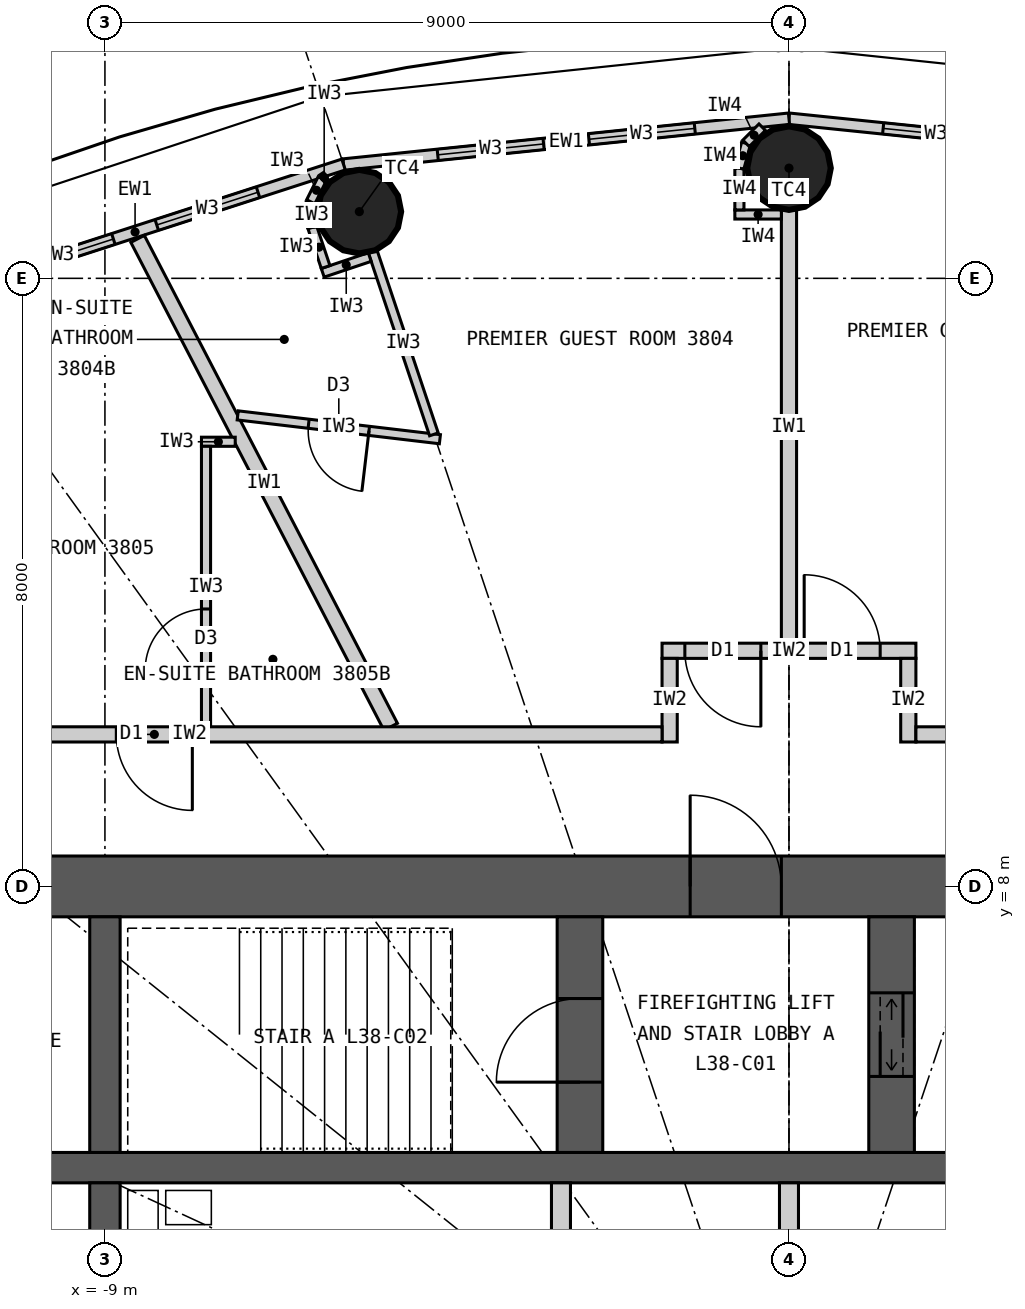
"""IFC4 building model, lengths in metres.
Left out: names, types, materials, properties, quantities, classifications, styles, units other than length and angle.
Written with IfcOpenShell. Run it as: python <this file> out.ifc"""

import sys

from ifc_helpers import new_model, si_unit, direction, frame, frame_2d, origin, origin_2d, place, context, subcontext, project, spatial, rectangle, circle, extrude, element, fill, save


model = new_model("IFC4")
c1 = context("Model", 3, precision=1e-05, world=origin(), true_north=direction((0.0, 1.0)))
c2 = subcontext(c1, "Body", "Model", "MODEL_VIEW")
j1 = project(units=[si_unit("LENGTHUNIT", "METRE"), si_unit("PLANEANGLEUNIT", "RADIAN")], contexts=[c1])
p1 = place(None, origin())
s1 = spatial("IfcSite", under=j1, at=p1, CompositionType="ELEMENT")
p2 = place(p1, origin())
s2 = spatial("IfcBuilding", under=s1, at=p2, CompositionType="ELEMENT")
p3 = place(p2, frame((0.0, 0.0, 146.7)))
s3 = spatial("IfcBuildingStorey", under=s2, at=p3, CompositionType="ELEMENT", Elevation=146.7)
for number, where, z_axis, x_axis in (
    (1, (0.0, 17.45, 0.0), (0.0, 0.0, 1.0), (1.0, 0.0, 0.0)),
    (2, (-5.653, 16.877, 0.0), (0.0, 0.0, 1.0), (1.0, 0.0, 0.0)),
):
    element("IfcColumn", number, at=place(p3, frame(where, z_axis=z_axis, x_axis=x_axis)), inside=s3, PredefinedType="COLUMN", context=c2, shape_type="SweptSolid", body=[
        extrude(circle(Radius=0.55, at=origin_2d()), origin(), (0.0, 0.0, 1.0), 3.3),
    ])
p4 = place(p3, frame((-12.4, 8.0, 0.0), z_axis=(0.0, 0.0, 1.0), x_axis=(1.0, 0.0, 0.0)))
e3 = element("IfcWall", 3, at=p4, inside=s3, PredefinedType="SHEAR", context=c2, shape_type="SweptSolid", body=[
    extrude(rectangle(XDim=24.8, YDim=0.8, at=frame_2d((12.4, 0.0))), origin(), (0.0, 0.0, 1.0), 3.3),
])
p5 = place(p4, frame((11.1, 0.0, 0.0)))
e4 = element("IfcOpeningElement", 4, at=p5, cuts=e3, PredefinedType="OPENING", context=c2, shape_type="SweptSolid", body=[
    extrude(rectangle(XDim=1.2, YDim=2.2, at=frame_2d((0.6, 1.1))), frame((0.0, 0.41, 0.0), z_axis=(0.0, -1.0, 0.0), x_axis=(1.0, 0.0, 0.0)), (0.0, 0.0, 1.0), 0.82),
])
p6 = place(p4, frame((18.7, 0.0, 0.0)))
e5 = element("IfcOpeningElement", 5, at=p6, cuts=e3, PredefinedType="OPENING", context=c2, shape_type="SweptSolid", body=[
    extrude(rectangle(XDim=0.9, YDim=2.2, at=frame_2d((0.45, 1.1))), frame((0.0, 0.41, 0.0), z_axis=(0.0, -1.0, 0.0), x_axis=(1.0, 0.0, 0.0)), (0.0, 0.0, 1.0), 0.82),
])
p7 = place(p3, frame((-11.6, 4.3, 0.0), z_axis=(0.0, 0.0, 1.0), x_axis=(1.0, 0.0, 0.0)))
e6 = element("IfcWall", 6, at=p7, inside=s3, PredefinedType="SHEAR", context=c2, shape_type="SweptSolid", body=[
    extrude(rectangle(XDim=23.2, YDim=0.4, at=frame_2d((11.6, 0.0))), origin(), (0.0, 0.0, 1.0), 3.3),
])
p8 = place(p3, frame((-9.0, 4.5, 0.0), z_axis=(0.0, 0.0, 1.0), x_axis=(0.0, 1.0, 0.0)))
e7 = element("IfcWall", 7, at=p8, inside=s3, PredefinedType="SHEAR", context=c2, shape_type="SweptSolid", body=[
    extrude(rectangle(XDim=3.1, YDim=0.4, at=frame_2d((1.55, 0.0))), origin(), (0.0, 0.0, 1.0), 3.3),
])
p9 = place(p3, frame((-9.0, 1.75, 0.0), z_axis=(0.0, 0.0, 1.0), x_axis=(0.0, 1.0, 0.0)))
e8 = element("IfcWall", 8, at=p9, inside=s3, PredefinedType="SHEAR", context=c2, shape_type="SweptSolid", body=[
    extrude(rectangle(XDim=2.35, YDim=0.4, at=frame_2d((1.175, 0.0))), origin(), (0.0, 0.0, 1.0), 3.3),
])
p10 = place(p3, frame((-2.75, 4.5, 0.0), z_axis=(0.0, 0.0, 1.0), x_axis=(0.0, 1.0, 0.0)))
e9 = element("IfcWall", 9, at=p10, inside=s3, PredefinedType="SHEAR", context=c2, shape_type="SweptSolid", body=[
    extrude(rectangle(XDim=3.1, YDim=0.6, at=frame_2d((1.55, 0.0))), origin(), (0.0, 0.0, 1.0), 3.3),
])
p11 = place(p10, frame((0.925, 0.0, 0.0)))
e10 = element("IfcOpeningElement", 10, at=p11, cuts=e9, PredefinedType="OPENING", context=c2, shape_type="SweptSolid", body=[
    extrude(rectangle(XDim=1.1, YDim=2.2, at=frame_2d((0.55, 1.1))), frame((0.0, 0.31, 0.0), z_axis=(0.0, -1.0, 0.0), x_axis=(1.0, 0.0, 0.0)), (0.0, 0.0, 1.0), 0.62),
])
p12 = place(p3, frame((1.35, 4.5, 0.0), z_axis=(0.0, 0.0, 1.0), x_axis=(0.0, 1.0, 0.0)))
e11 = element("IfcWall", 11, at=p12, inside=s3, PredefinedType="SHEAR", context=c2, shape_type="SweptSolid", body=[
    extrude(rectangle(XDim=3.1, YDim=0.6, at=frame_2d((1.55, 0.0))), origin(), (0.0, 0.0, 1.0), 3.3),
])
p13 = place(p12, frame((1.0, 0.0, 0.0)))
e12 = element("IfcOpeningElement", 12, at=p13, cuts=e11, PredefinedType="OPENING", context=c2, shape_type="SweptSolid", body=[
    extrude(rectangle(XDim=1.1, YDim=2.2, at=frame_2d((0.55, 1.1))), frame((0.0, 0.31, 0.0), z_axis=(0.0, -1.0, 0.0), x_axis=(1.0, 0.0, 0.0)), (0.0, 0.0, 1.0), 0.62),
])
for number, where, z_axis, x_axis in (
    (13, (-3.0, 1.75, 0.0), (0.0, 0.0, 1.0), (0.0, 1.0, 0.0)),
    (14, (0.0, 1.75, 0.0), (0.0, 0.0, 1.0), (0.0, 1.0, 0.0)),
):
    element("IfcWall", number, at=place(p3, frame(where, z_axis=z_axis, x_axis=x_axis)), inside=s3, PredefinedType="PARTITIONING", context=c2, shape_type="SweptSolid", body=[
        extrude(rectangle(XDim=2.35, YDim=0.25, at=frame_2d((1.175, 0.0))), origin(), (0.0, 0.0, 1.0), 3.3),
    ])
p14 = place(p3, frame((5.86, 17.497, 0.0), z_axis=(0.0, 0.0, 1.0), x_axis=(-0.994751738032, 0.102318032045, 0.0)))
e15 = element("IfcWall", 15, at=p14, inside=s3, PredefinedType="ELEMENTEDWALL", context=c2, shape_type="SweptSolid", body=[
    extrude(rectangle(XDim=5.891, YDim=0.15, at=frame_2d((2.946, 0.0))), origin(), (0.0, 0.0, 1.0), 3.12),
])
p15 = place(p14, frame((1.246, 0.0, 0.9)))
e16 = element("IfcOpeningElement", 16, at=p15, cuts=e15, PredefinedType="OPENING", context=c2, shape_type="SweptSolid", body=[
    extrude(rectangle(XDim=1.4, YDim=1.9, at=frame_2d((0.7, 0.95))), frame((0.0, 0.085, 0.0), z_axis=(0.0, -1.0, 0.0), x_axis=(1.0, 0.0, 0.0)), (0.0, 0.0, 1.0), 0.17),
])
p16 = place(p14, frame((3.246, 0.0, 0.9)))
e17 = element("IfcOpeningElement", 17, at=p16, cuts=e15, PredefinedType="OPENING", context=c2, shape_type="SweptSolid", body=[
    extrude(rectangle(XDim=1.4, YDim=1.9, at=frame_2d((0.7, 0.95))), frame((0.0, 0.085, 0.0), z_axis=(0.0, -1.0, 0.0), x_axis=(1.0, 0.0, 0.0)), (0.0, 0.0, 1.0), 0.17),
])
p17 = place(p3, frame((0.0, 18.1, 0.0), z_axis=(0.0, 0.0, 1.0), x_axis=(-0.994751738032, -0.102318032045, 0.0)))
e18 = element("IfcWall", 18, at=p17, inside=s3, PredefinedType="ELEMENTEDWALL", context=c2, shape_type="SweptSolid", body=[
    extrude(rectangle(XDim=5.891, YDim=0.15, at=frame_2d((2.946, 0.0))), origin(), (0.0, 0.0, 1.0), 3.12),
])
p18 = place(p17, frame((1.246, 0.0, 0.9)))
e19 = element("IfcOpeningElement", 19, at=p18, cuts=e18, PredefinedType="OPENING", context=c2, shape_type="SweptSolid", body=[
    extrude(rectangle(XDim=1.4, YDim=1.9, at=frame_2d((0.7, 0.95))), frame((0.0, 0.085, 0.0), z_axis=(0.0, -1.0, 0.0), x_axis=(1.0, 0.0, 0.0)), (0.0, 0.0, 1.0), 0.17),
])
p19 = place(p17, frame((3.246, 0.0, 0.9)))
e20 = element("IfcOpeningElement", 20, at=p19, cuts=e18, PredefinedType="OPENING", context=c2, shape_type="SweptSolid", body=[
    extrude(rectangle(XDim=1.4, YDim=1.9, at=frame_2d((0.7, 0.95))), frame((0.0, 0.085, 0.0), z_axis=(0.0, -1.0, 0.0), x_axis=(1.0, 0.0, 0.0)), (0.0, 0.0, 1.0), 0.17),
])
p20 = place(p3, frame((-5.86, 17.497, 0.0), z_axis=(0.0, 0.0, 1.0), x_axis=(-0.951432482129, -0.307857486429, 0.0)))
e21 = element("IfcWall", 21, at=p20, inside=s3, PredefinedType="ELEMENTEDWALL", context=c2, shape_type="SweptSolid", body=[
    extrude(rectangle(XDim=5.766, YDim=0.15, at=frame_2d((2.883, 0.0))), origin(), (0.0, 0.0, 1.0), 3.12),
])
p21 = place(p20, frame((1.183, 0.0, 0.9)))
e22 = element("IfcOpeningElement", 22, at=p21, cuts=e21, PredefinedType="OPENING", context=c2, shape_type="SweptSolid", body=[
    extrude(rectangle(XDim=1.4, YDim=1.9, at=frame_2d((0.7, 0.95))), frame((0.0, 0.085, 0.0), z_axis=(0.0, -1.0, 0.0), x_axis=(1.0, 0.0, 0.0)), (0.0, 0.0, 1.0), 0.17),
])
p22 = place(p20, frame((3.183, 0.0, 0.9)))
e23 = element("IfcOpeningElement", 23, at=p22, cuts=e21, PredefinedType="OPENING", context=c2, shape_type="SweptSolid", body=[
    extrude(rectangle(XDim=1.4, YDim=1.9, at=frame_2d((0.7, 0.95))), frame((0.0, 0.085, 0.0), z_axis=(0.0, -1.0, 0.0), x_axis=(1.0, 0.0, 0.0)), (0.0, 0.0, 1.0), 0.17),
])
p23 = place(p3, frame((0.0, 11.2, 0.0), z_axis=(0.0, 0.0, 1.0), x_axis=(0.0, 1.0, 0.0)))
e24 = element("IfcWall", 24, at=p23, inside=s3, PredefinedType="PARTITIONING", context=c2, shape_type="SweptSolid", body=[
    extrude(rectangle(XDim=5.7, YDim=0.2, at=frame_2d((2.85, 0.0))), origin(), (0.0, 0.0, 1.0), 2.42),
])
p24 = place(p3, frame((-5.24, 10.1, 0.0), z_axis=(0.0, 0.0, 1.0), x_axis=(-0.460532965373, 0.887642601391, 0.0)))
e25 = element("IfcWall", 25, at=p24, inside=s3, PredefinedType="PARTITIONING", context=c2, shape_type="SweptSolid", body=[
    extrude(rectangle(XDim=7.231, YDim=0.2, at=frame_2d((3.616, 0.0))), origin(), (0.0, 0.0, 1.0), 3.12),
])
p25 = place(p3, frame((-1.67, 11.1, 0.0), z_axis=(0.0, 0.0, 1.0), x_axis=(1.0, 0.0, 0.0)))
e26 = element("IfcWall", 26, at=p25, inside=s3, PredefinedType="PARTITIONING", context=c2, shape_type="SweptSolid", body=[
    extrude(rectangle(XDim=3.34, YDim=0.2, at=frame_2d((1.67, 0.0))), origin(), (0.0, 0.0, 1.0), 3.12),
])
p26 = place(p25, frame((1.87, 0.0, 0.0)))
e27 = element("IfcOpeningElement", 27, at=p26, cuts=e26, PredefinedType="OPENING", context=c2, shape_type="SweptSolid", body=[
    extrude(rectangle(XDim=1.0, YDim=2.2, at=frame_2d((0.5, 1.1))), frame((0.0, 0.11, 0.0), z_axis=(0.0, -1.0, 0.0), x_axis=(1.0, 0.0, 0.0)), (0.0, 0.0, 1.0), 0.22),
])
p27 = place(p25, frame((0.3, 0.0, 0.0)))
e28 = element("IfcOpeningElement", 28, at=p27, cuts=e26, PredefinedType="OPENING", context=c2, shape_type="SweptSolid", body=[
    extrude(rectangle(XDim=1.0, YDim=2.2, at=frame_2d((0.5, 1.1))), frame((0.0, 0.11, 0.0), z_axis=(0.0, -1.0, 0.0), x_axis=(1.0, 0.0, 0.0)), (0.0, 0.0, 1.0), 0.22),
])
for number, where, z_axis, x_axis in (
    (29, (-1.57, 9.9, 0.0), (0.0, 0.0, 1.0), (0.0, 1.0, 0.0)),
    (30, (1.57, 9.9, 0.0), (0.0, 0.0, 1.0), (0.0, 1.0, 0.0)),
):
    element("IfcWall", number, at=place(p3, frame(where, z_axis=z_axis, x_axis=x_axis)), inside=s3, PredefinedType="PARTITIONING", context=c2, shape_type="SweptSolid", body=[
        extrude(rectangle(XDim=1.1, YDim=0.2, at=frame_2d((0.55, 0.0))), origin(), (0.0, 0.0, 1.0), 3.12),
    ])
p28 = place(p3, frame((-7.253, 14.197, 0.0), z_axis=(0.0, 0.0, 1.0), x_axis=(0.993128188393, -0.117031625725, 0.0)))
e31 = element("IfcWall", 31, at=p28, inside=s3, PredefinedType="PARTITIONING", context=c2, shape_type="SweptSolid", body=[
    extrude(rectangle(XDim=2.678, YDim=0.12, at=frame_2d((1.339, 0.0))), origin(), (0.0, 0.0, 1.0), 3.12),
])
p29 = place(p28, frame((0.939, 0.0, 0.0)))
e32 = element("IfcOpeningElement", 32, at=p29, cuts=e31, PredefinedType="OPENING", context=c2, shape_type="SweptSolid", body=[
    extrude(rectangle(XDim=0.8, YDim=2.1, at=frame_2d((0.4, 1.05))), frame((0.0, 0.07, 0.0), z_axis=(0.0, -1.0, 0.0), x_axis=(1.0, 0.0, 0.0)), (0.0, 0.0, 1.0), 0.14),
])
p30 = place(p3, frame((-4.671, 13.948, 0.0), z_axis=(0.0, 0.0, 1.0), x_axis=(-0.317669167093, 0.948201613729, 0.0)))
e33 = element("IfcWall", 33, at=p30, inside=s3, PredefinedType="PARTITIONING", context=c2, shape_type="SweptSolid", body=[
    extrude(rectangle(XDim=2.54, YDim=0.12, at=frame_2d((1.27, 0.0))), origin(), (0.0, 0.0, 1.0), 2.42),
])
p31 = place(p3, frame((-5.516, 16.28, 0.0), z_axis=(0.0, 0.0, 1.0), x_axis=(-0.948157944392, -0.317799484717, 0.0)))
e34 = element("IfcWall", 34, at=p31, inside=s3, PredefinedType="PARTITIONING", context=c2, shape_type="SweptSolid", body=[
    extrude(rectangle(XDim=0.652, YDim=0.12, at=frame_2d((0.326, 0.0))), origin(), (0.0, 0.0, 1.0), 3.12),
])
p32 = place(p3, frame((-6.097, 16.149, 0.0), z_axis=(0.0, 0.0, 1.0), x_axis=(-0.317292604854, 0.948327687514, 0.0)))
e35 = element("IfcWall", 35, at=p32, inside=s3, PredefinedType="PARTITIONING", context=c2, shape_type="SweptSolid", body=[
    extrude(rectangle(XDim=0.55, YDim=0.12, at=frame_2d((0.275, 0.0))), origin(), (0.0, 0.0, 1.0), 3.12),
])
for number, where, z_axis, x_axis in (
    (36, (-6.271, 16.67, 0.0), (0.0, 0.0, 1.0), (-0.061, 0.998, 0.0)),
    (37, (-6.292, 17.007, 0.0), (0.0, 0.0, 1.0), (0.445, 0.895, 0.0)),
):
    element("IfcWall", number, at=place(p3, frame(where, z_axis=z_axis, x_axis=x_axis)), inside=s3, PredefinedType="PARTITIONING", context=c2, shape_type="SweptSolid", body=[
        extrude(rectangle(XDim=0.338, YDim=0.12, at=frame_2d((0.169, 0.0))), origin(), (0.0, 0.0, 1.0), 3.12),
    ])
p33 = place(p3, frame((-6.142, 17.31, 0.0), z_axis=(0.0, 0.0, 1.0), x_axis=(0.835039693181, 0.550189704386, 0.0)))
e38 = element("IfcWall", 38, at=p33, inside=s3, PredefinedType="PARTITIONING", context=c2, shape_type="SweptSolid", body=[
    extrude(rectangle(XDim=0.062, YDim=0.12, at=frame_2d((0.031, 0.0))), origin(), (0.0, 0.0, 1.0), 3.12),
])
p34 = place(p3, frame((-7.286, 13.85, 0.0), z_axis=(0.0, 0.0, 1.0), x_axis=(-1.0, 0.0, 0.0)))
e39 = element("IfcWall", 39, at=p34, inside=s3, PredefinedType="PARTITIONING", context=c2, shape_type="SweptSolid", body=[
    extrude(rectangle(XDim=0.444, YDim=0.12, at=frame_2d((0.222, 0.0))), origin(), (0.0, 0.0, 1.0), 3.12),
])
p35 = place(p3, frame((-7.67, 10.1, 0.0), z_axis=(0.0, 0.0, 1.0), x_axis=(0.0, 1.0, 0.0)))
e40 = element("IfcWall", 40, at=p35, inside=s3, PredefinedType="PARTITIONING", context=c2, shape_type="SweptSolid", body=[
    extrude(rectangle(XDim=3.69, YDim=0.12, at=frame_2d((1.845, 0.0))), origin(), (0.0, 0.0, 1.0), 3.12),
])
p36 = place(p35, frame((0.75, 0.0, 0.0)))
e41 = element("IfcOpeningElement", 41, at=p36, cuts=e40, PredefinedType="OPENING", context=c2, shape_type="SweptSolid", body=[
    extrude(rectangle(XDim=0.8, YDim=2.1, at=frame_2d((0.4, 1.05))), frame((0.0, 0.07, 0.0), z_axis=(0.0, -1.0, 0.0), x_axis=(1.0, 0.0, 0.0)), (0.0, 0.0, 1.0), 0.14),
])
p37 = place(p3, frame((-14.1, 10.0, 0.0), z_axis=(0.0, 0.0, 1.0), x_axis=(1.0, 0.0, 0.0)))
e42 = element("IfcWall", 42, at=p37, inside=s3, PredefinedType="PARTITIONING", context=c2, shape_type="SweptSolid", body=[
    extrude(rectangle(XDim=12.43, YDim=0.2, at=frame_2d((6.215, 0.0))), origin(), (0.0, 0.0, 1.0), 3.12),
])
p38 = place(p37, frame((5.25, 0.0, 0.0)))
e43 = element("IfcOpeningElement", 43, at=p38, cuts=e42, PredefinedType="OPENING", context=c2, shape_type="SweptSolid", body=[
    extrude(rectangle(XDim=1.0, YDim=2.2, at=frame_2d((0.5, 1.1))), frame((0.0, 0.11, 0.0), z_axis=(0.0, -1.0, 0.0), x_axis=(1.0, 0.0, 0.0)), (0.0, 0.0, 1.0), 0.22),
])
p39 = place(p3, frame((1.67, 10.0, 0.0), z_axis=(0.0, 0.0, 1.0), x_axis=(1.0, 0.0, 0.0)))
e44 = element("IfcWall", 44, at=p39, inside=s3, PredefinedType="PARTITIONING", context=c2, shape_type="SweptSolid", body=[
    extrude(rectangle(XDim=12.43, YDim=0.2, at=frame_2d((6.215, 0.0))), origin(), (0.0, 0.0, 1.0), 3.12),
])
p40 = place(p39, frame((6.675, 0.0, 0.0)))
e45 = element("IfcOpeningElement", 45, at=p40, cuts=e44, PredefinedType="OPENING", context=c2, shape_type="SweptSolid", body=[
    extrude(rectangle(XDim=1.0, YDim=2.2, at=frame_2d((0.5, 1.1))), frame((0.0, 0.11, 0.0), z_axis=(0.0, -1.0, 0.0), x_axis=(1.0, 0.0, 0.0)), (0.0, 0.0, 1.0), 0.22),
])
p41 = place(p3, frame((-0.1, 16.84, 0.0), z_axis=(0.0, 0.0, 1.0), x_axis=(-1.0, 0.0, 0.0)))
e46 = element("IfcWall", 46, at=p41, inside=s3, PredefinedType="PARTITIONING", context=c2, shape_type="SweptSolid", body=[
    extrude(rectangle(XDim=0.612, YDim=0.12, at=frame_2d((0.306, 0.0))), origin(), (0.0, 0.0, 1.0), 3.12),
])
p42 = place(p3, frame((-0.652, 16.9, 0.0), z_axis=(0.0, 0.0, 1.0), x_axis=(0.0, 1.0, 0.0)))
e47 = element("IfcWall", 47, at=p42, inside=s3, PredefinedType="PARTITIONING", context=c2, shape_type="SweptSolid", body=[
    extrude(rectangle(XDim=0.55, YDim=0.12, at=frame_2d((0.275, 0.0))), origin(), (0.0, 0.0, 1.0), 3.12),
])
p43 = place(p3, frame((-0.652, 17.45, 0.0), z_axis=(0.0, 0.0, 1.0), x_axis=(0.258832454679, 0.965922233104, 0.0)))
e48 = element("IfcWall", 48, at=p43, inside=s3, PredefinedType="PARTITIONING", context=c2, shape_type="SweptSolid", body=[
    extrude(rectangle(XDim=0.338, YDim=0.12, at=frame_2d((0.169, 0.0))), origin(), (0.0, 0.0, 1.0), 3.12),
])
p44 = place(p3, frame((-0.565, 17.776, 0.0), z_axis=(0.0, 0.0, 1.0), x_axis=(0.707106781187, 0.707106781187, 0.0)))
e49 = element("IfcWall", 49, at=p44, inside=s3, PredefinedType="PARTITIONING", context=c2, shape_type="SweptSolid", body=[
    extrude(rectangle(XDim=0.301, YDim=0.12, at=frame_2d((0.15, 0.0))), origin(), (0.0, 0.0, 1.0), 3.12),
])
p45 = place(p16, origin())
e50 = element("IfcWindow", 50, at=p45, inside=s3, PartitioningType="SINGLE_PANEL", PredefinedType="WINDOW", context=c2, shape_type="SweptSolid", body=[
    extrude(rectangle(XDim=1.4, YDim=1.9, at=frame_2d((0.7, 0.95))), frame((0.0, 0.03, 0.0), z_axis=(0.0, -1.0, 0.0), x_axis=(1.0, 0.0, 0.0)), (0.0, 0.0, 1.0), 0.06),
])
fill(e17, e50)
p46 = place(p18, origin())
e51 = element("IfcWindow", 51, at=p46, inside=s3, PartitioningType="SINGLE_PANEL", PredefinedType="WINDOW", context=c2, shape_type="SweptSolid", body=[
    extrude(rectangle(XDim=1.4, YDim=1.9, at=frame_2d((0.7, 0.95))), frame((0.0, 0.03, 0.0), z_axis=(0.0, -1.0, 0.0), x_axis=(1.0, 0.0, 0.0)), (0.0, 0.0, 1.0), 0.06),
])
fill(e19, e51)
p47 = place(p19, origin())
e52 = element("IfcWindow", 52, at=p47, inside=s3, PartitioningType="SINGLE_PANEL", PredefinedType="WINDOW", context=c2, shape_type="SweptSolid", body=[
    extrude(rectangle(XDim=1.4, YDim=1.9, at=frame_2d((0.7, 0.95))), frame((0.0, 0.03, 0.0), z_axis=(0.0, -1.0, 0.0), x_axis=(1.0, 0.0, 0.0)), (0.0, 0.0, 1.0), 0.06),
])
fill(e20, e52)
p48 = place(p21, origin())
e53 = element("IfcWindow", 53, at=p48, inside=s3, PartitioningType="SINGLE_PANEL", PredefinedType="WINDOW", context=c2, shape_type="SweptSolid", body=[
    extrude(rectangle(XDim=1.4, YDim=1.9, at=frame_2d((0.7, 0.95))), frame((0.0, 0.03, 0.0), z_axis=(0.0, -1.0, 0.0), x_axis=(1.0, 0.0, 0.0)), (0.0, 0.0, 1.0), 0.06),
])
fill(e22, e53)
p49 = place(p22, origin())
e54 = element("IfcWindow", 54, at=p49, inside=s3, PartitioningType="SINGLE_PANEL", PredefinedType="WINDOW", context=c2, shape_type="SweptSolid", body=[
    extrude(rectangle(XDim=1.4, YDim=1.9, at=frame_2d((0.7, 0.95))), frame((0.0, 0.03, 0.0), z_axis=(0.0, -1.0, 0.0), x_axis=(1.0, 0.0, 0.0)), (0.0, 0.0, 1.0), 0.06),
])
fill(e23, e54)
p50 = place(p26, origin())
e55 = element("IfcDoor", 55, at=p50, inside=s3, OperationType="SINGLE_SWING_LEFT", PredefinedType="DOOR", context=c2, shape_type="SweptSolid", body=[
    extrude(rectangle(XDim=1.0, YDim=2.2, at=frame_2d((0.5, 1.1))), frame((0.0, 0.025, 0.0), z_axis=(0.0, -1.0, 0.0), x_axis=(1.0, 0.0, 0.0)), (0.0, 0.0, 1.0), 0.05),
])
fill(e27, e55)
p51 = place(p29, origin())
e56 = element("IfcDoor", 56, at=p51, inside=s3, OperationType="SINGLE_SWING_RIGHT", PredefinedType="DOOR", context=c2, shape_type="SweptSolid", body=[
    extrude(rectangle(XDim=0.8, YDim=2.1, at=frame_2d((0.4, 1.05))), frame((0.0, 0.025, 0.0), z_axis=(0.0, -1.0, 0.0), x_axis=(1.0, 0.0, 0.0)), (0.0, 0.0, 1.0), 0.05),
])
fill(e32, e56)
p52 = place(p27, origin())
e57 = element("IfcDoor", 57, at=p52, inside=s3, OperationType="SINGLE_SWING_RIGHT", PredefinedType="DOOR", context=c2, shape_type="SweptSolid", body=[
    extrude(rectangle(XDim=1.0, YDim=2.2, at=frame_2d((0.5, 1.1))), frame((0.0, 0.025, 0.0), z_axis=(0.0, -1.0, 0.0), x_axis=(1.0, 0.0, 0.0)), (0.0, 0.0, 1.0), 0.05),
])
fill(e28, e57)
p53 = place(p36, origin())
e58 = element("IfcDoor", 58, at=p53, inside=s3, OperationType="SINGLE_SWING_LEFT", PredefinedType="DOOR", context=c2, shape_type="SweptSolid", body=[
    extrude(rectangle(XDim=0.8, YDim=2.1, at=frame_2d((0.4, 1.05))), frame((0.0, 0.025, 0.0), z_axis=(0.0, -1.0, 0.0), x_axis=(1.0, 0.0, 0.0)), (0.0, 0.0, 1.0), 0.05),
])
fill(e41, e58)
p54 = place(p38, origin())
e59 = element("IfcDoor", 59, at=p54, inside=s3, OperationType="SINGLE_SWING_RIGHT", PredefinedType="DOOR", context=c2, shape_type="SweptSolid", body=[
    extrude(rectangle(XDim=1.0, YDim=2.2, at=frame_2d((0.5, 1.1))), frame((0.0, 0.025, 0.0), z_axis=(0.0, -1.0, 0.0), x_axis=(1.0, 0.0, 0.0)), (0.0, 0.0, 1.0), 0.05),
])
fill(e43, e59)
p55 = place(p5, origin())
e60 = element("IfcDoor", 60, at=p55, inside=s3, OperationType="SINGLE_SWING_LEFT", PredefinedType="DOOR", context=c2, shape_type="SweptSolid", body=[
    extrude(rectangle(XDim=1.2, YDim=2.2, at=frame_2d((0.6, 1.1))), frame((0.0, 0.025, 0.0), z_axis=(0.0, -1.0, 0.0), x_axis=(1.0, 0.0, 0.0)), (0.0, 0.0, 1.0), 0.05),
])
fill(e4, e60)
p56 = place(p11, origin())
e61 = element("IfcDoor", 61, at=p56, inside=s3, OperationType="SINGLE_SWING_LEFT", PredefinedType="DOOR", context=c2, shape_type="SweptSolid", body=[
    extrude(rectangle(XDim=1.1, YDim=2.2, at=frame_2d((0.55, 1.1))), frame((0.0, 0.025, 0.0), z_axis=(0.0, -1.0, 0.0), x_axis=(1.0, 0.0, 0.0)), (0.0, 0.0, 1.0), 0.05),
])
fill(e10, e61)
p57 = place(p13, origin())
e62 = element("IfcDoor", 62, at=p57, inside=s3, OperationType="DOUBLE_DOOR_SLIDING", PredefinedType="DOOR", context=c2, shape_type="SweptSolid", body=[
    extrude(rectangle(XDim=1.1, YDim=2.2, at=frame_2d((0.55, 1.1))), frame((0.0, 0.025, 0.0), z_axis=(0.0, -1.0, 0.0), x_axis=(1.0, 0.0, 0.0)), (0.0, 0.0, 1.0), 0.05),
])
fill(e12, e62)
save(model, sys.argv[1])
